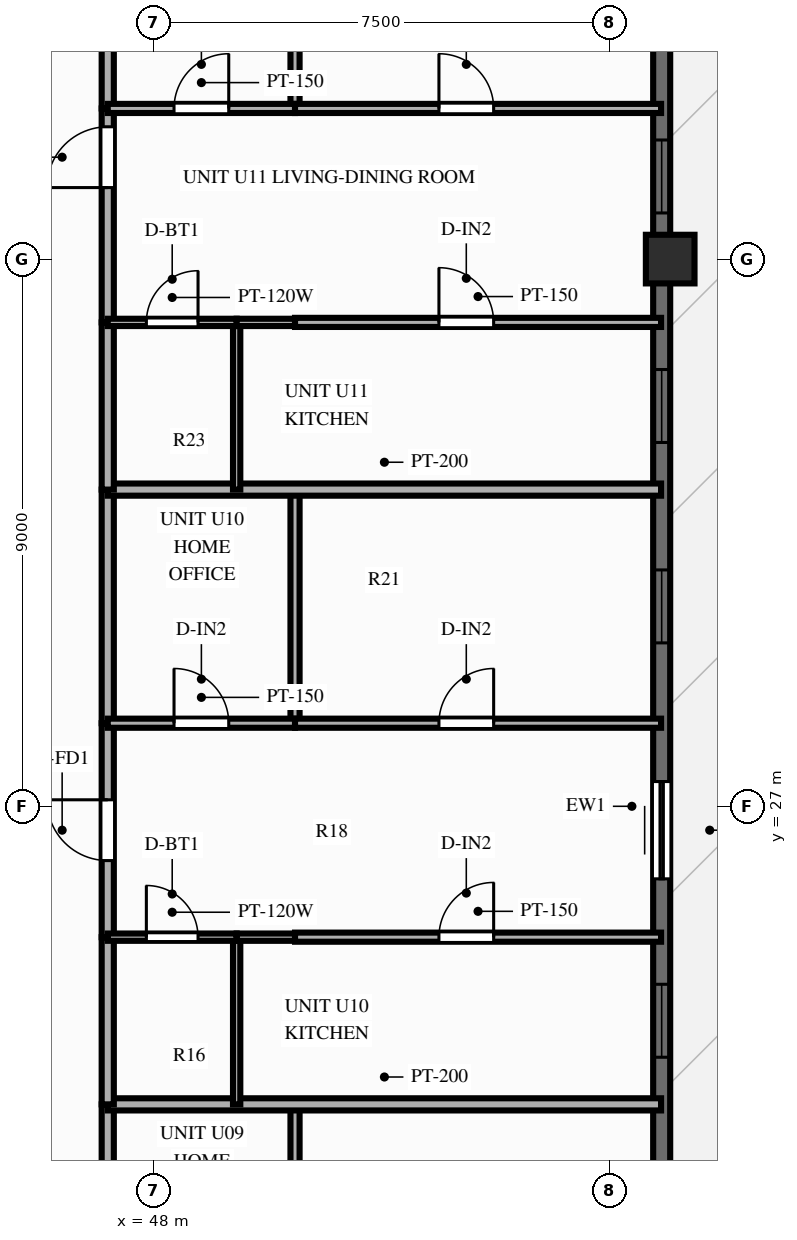
"""IFC4 building model, lengths in metres.
Left out: names, types, materials, properties, quantities, classifications, styles, units other than length and angle.
Written with IfcOpenShell. Run it as: python <this file> out.ifc"""

import sys

from ifc_helpers import new_model, si_unit, direction, frame, frame_2d, origin, origin_2d, place, context, subcontext, project, spatial, rectangle, extrude, source, transform, mapped, element, fill, save


model = new_model("IFC4")
c1 = context("Model", 3, precision=1e-05, world=origin(), true_north=direction((0.0, 1.0)))
c2 = subcontext(c1, "Body", "Model", "MODEL_VIEW")
j1 = project(units=[si_unit("LENGTHUNIT", "METRE"), si_unit("PLANEANGLEUNIT", "RADIAN")], contexts=[c1])
p1 = place(None, origin())
s1 = spatial("IfcSite", under=j1, at=p1, CompositionType="ELEMENT")
p2 = place(p1, origin())
s2 = spatial("IfcBuilding", under=s1, at=p2, CompositionType="ELEMENT")
p3 = place(p2, frame((0.0, 0.0, 196.6)))
s3 = spatial("IfcBuildingStorey", under=s2, at=p3, CompositionType="ELEMENT", Elevation=196.6)
m1 = source(origin(), c2, "Body", "SweptSolid", [
    extrude(rectangle(XDim=0.8, YDim=0.8, at=origin_2d()), origin(), (0.0, 0.0, 1.0), 3.0),
])
p4 = place(p3, frame((56.5, 36.0, 0.0), z_axis=(0.0, 0.0, 1.0), x_axis=(1.0, 0.0, 0.0)))
e1 = element("IfcColumn", 1, at=p4, inside=s3, PredefinedType="COLUMN", context=c2, shape_type="MappedRepresentation", body=[
    mapped(m1, transform((0.0, 0.0, 0.0), scale=1.0)),
])
p5 = place(p3, frame((56.36, 11.5, 0.0), z_axis=(0.0, 0.0, 1.0), x_axis=(0.0, 1.0, 0.0)))
e2 = element("IfcWall", 2, at=p5, inside=s3, PredefinedType="SOLIDWALL", context=c2, shape_type="SweptSolid", body=[
    extrude(rectangle(XDim=31.0, YDim=0.28, at=frame_2d((15.5, 0.0))), origin(), (0.0, 0.0, 1.0), 2.28),
])
p6 = place(p5, frame((0.985, 0.0, 0.25)))
e3 = element("IfcOpeningElement", 3, at=p6, cuts=e2, PredefinedType="OPENING", context=c2, shape_type="SweptSolid", body=[
    extrude(rectangle(XDim=1.2, YDim=1.5, at=frame_2d((0.6, 0.75))), frame((0.0, 0.152, 0.0), z_axis=(0.0, -1.0, 0.0), x_axis=(1.0, 0.0, 0.0)), (0.0, 0.0, 1.0), 0.304),
])
p7 = place(p5, frame((3.995, 0.0, 0.25)))
e4 = element("IfcOpeningElement", 4, at=p7, cuts=e2, PredefinedType="OPENING", context=c2, shape_type="SweptSolid", body=[
    extrude(rectangle(XDim=1.2, YDim=1.5, at=frame_2d((0.6, 0.75))), frame((0.0, 0.152, 0.0), z_axis=(0.0, -1.0, 0.0), x_axis=(1.0, 0.0, 0.0)), (0.0, 0.0, 1.0), 0.304),
])
p8 = place(p5, frame((8.089, 0.0, 0.25)))
e5 = element("IfcOpeningElement", 5, at=p8, cuts=e2, PredefinedType="OPENING", context=c2, shape_type="SweptSolid", body=[
    extrude(rectangle(XDim=1.2, YDim=1.5, at=frame_2d((0.6, 0.75))), frame((0.0, 0.152, 0.0), z_axis=(0.0, -1.0, 0.0), x_axis=(1.0, 0.0, 0.0)), (0.0, 0.0, 1.0), 0.304),
])
p9 = place(p5, frame((11.373, 0.0, 0.25)))
e6 = element("IfcOpeningElement", 6, at=p9, cuts=e2, PredefinedType="OPENING", context=c2, shape_type="SweptSolid", body=[
    extrude(rectangle(XDim=1.2, YDim=1.5, at=frame_2d((0.6, 0.75))), frame((0.0, 0.152, 0.0), z_axis=(0.0, -1.0, 0.0), x_axis=(1.0, 0.0, 0.0)), (0.0, 0.0, 1.0), 0.304),
])
p10 = place(p5, frame((15.907, 0.0, 0.0), z_axis=(0.0, 0.0, 1.0), x_axis=(-1.0, 0.0, 0.0)))
e7 = element("IfcOpeningElement", 7, at=p10, cuts=e2, PredefinedType="OPENING", context=c2, shape_type="SweptSolid", body=[
    extrude(rectangle(XDim=1.6, YDim=2.15, at=frame_2d((0.8, 1.075))), frame((0.0, 0.152, 0.0), z_axis=(0.0, -1.0, 0.0), x_axis=(1.0, 0.0, 0.0)), (0.0, 0.0, 1.0), 0.304),
])
p11 = place(p5, frame((18.188, 0.0, 0.25)))
e8 = element("IfcOpeningElement", 8, at=p11, cuts=e2, PredefinedType="OPENING", context=c2, shape_type="SweptSolid", body=[
    extrude(rectangle(XDim=1.2, YDim=1.5, at=frame_2d((0.6, 0.75))), frame((0.0, 0.152, 0.0), z_axis=(0.0, -1.0, 0.0), x_axis=(1.0, 0.0, 0.0)), (0.0, 0.0, 1.0), 0.304),
])
p12 = place(p5, frame((21.484, 0.0, 0.25)))
e9 = element("IfcOpeningElement", 9, at=p12, cuts=e2, PredefinedType="OPENING", context=c2, shape_type="SweptSolid", body=[
    extrude(rectangle(XDim=1.2, YDim=1.5, at=frame_2d((0.6, 0.75))), frame((0.0, 0.152, 0.0), z_axis=(0.0, -1.0, 0.0), x_axis=(1.0, 0.0, 0.0)), (0.0, 0.0, 1.0), 0.304),
])
p13 = place(p5, frame((25.259, 0.0, 0.25)))
e10 = element("IfcOpeningElement", 10, at=p13, cuts=e2, PredefinedType="OPENING", context=c2, shape_type="SweptSolid", body=[
    extrude(rectangle(XDim=1.2, YDim=1.5, at=frame_2d((0.6, 0.75))), frame((0.0, 0.152, 0.0), z_axis=(0.0, -1.0, 0.0), x_axis=(1.0, 0.0, 0.0)), (0.0, 0.0, 1.0), 0.304),
])
p14 = place(p5, frame((28.269, 0.0, 0.25)))
e11 = element("IfcOpeningElement", 11, at=p14, cuts=e2, PredefinedType="OPENING", context=c2, shape_type="SweptSolid", body=[
    extrude(rectangle(XDim=1.2, YDim=1.5, at=frame_2d((0.6, 0.75))), frame((0.0, 0.152, 0.0), z_axis=(0.0, -1.0, 0.0), x_axis=(1.0, 0.0, 0.0)), (0.0, 0.0, 1.0), 0.304),
])
p15 = place(p3, frame((47.25, 18.28, 0.0), z_axis=(0.0, 0.0, 1.0), x_axis=(0.0, 1.0, 0.0)))
e12 = element("IfcWall", 12, at=p15, inside=s3, PredefinedType="PARTITIONING", context=c2, shape_type="SweptSolid", body=[
    extrude(rectangle(XDim=3.818, YDim=0.2, at=frame_2d((1.909, 0.0))), origin(), (0.0, 0.0, 1.0), 2.79),
])
p16 = place(p3, frame((50.33, 18.28, 0.0), z_axis=(0.0, 0.0, 1.0), x_axis=(0.0, 1.0, 0.0)))
e13 = element("IfcWall", 13, at=p16, inside=s3, PredefinedType="PARTITIONING", context=c2, shape_type="SweptSolid", body=[
    extrude(rectangle(XDim=3.818, YDim=0.15, at=frame_2d((1.909, 0.0))), origin(), (0.0, 0.0, 1.0), 2.49),
])
p17 = place(p3, frame((47.25, 22.098, 0.0), z_axis=(0.0, 0.0, 1.0), x_axis=(1.0, 0.0, 0.0)))
e14 = element("IfcWall", 14, at=p17, inside=s3, PredefinedType="PARTITIONING", context=c2, shape_type="SweptSolid", body=[
    extrude(rectangle(XDim=9.1, YDim=0.2, at=frame_2d((4.55, 0.0))), origin(), (0.0, 0.0, 1.0), 2.39),
])
p18 = place(p3, frame((47.25, 22.098, 0.0), z_axis=(0.0, 0.0, 1.0), x_axis=(0.0, 1.0, 0.0)))
e15 = element("IfcWall", 15, at=p18, inside=s3, PredefinedType="PARTITIONING", context=c2, shape_type="SweptSolid", body=[
    extrude(rectangle(XDim=2.75, YDim=0.2, at=frame_2d((1.375, 0.0))), origin(), (0.0, 0.0, 1.0), 2.79),
])
p19 = place(p3, frame((47.25, 24.848, 0.0), z_axis=(0.0, 0.0, 1.0), x_axis=(0.0, 1.0, 0.0)))
e16 = element("IfcWall", 16, at=p19, inside=s3, PredefinedType="PARTITIONING", context=c2, shape_type="SweptSolid", body=[
    extrude(rectangle(XDim=3.519, YDim=0.2, at=frame_2d((1.759, 0.0))), origin(), (0.0, 0.0, 1.0), 2.79),
])
p20 = place(p19, frame((1.26, 0.0, 0.0)))
e17 = element("IfcOpeningElement", 17, at=p20, cuts=e16, PredefinedType="OPENING", context=c2, shape_type="SweptSolid", body=[
    extrude(rectangle(XDim=1.0, YDim=2.15, at=frame_2d((0.5, 1.075))), frame((0.0, 0.112, 0.0), z_axis=(0.0, -1.0, 0.0), x_axis=(1.0, 0.0, 0.0)), (0.0, 0.0, 1.0), 0.224),
])
p21 = place(p3, frame((47.25, 28.366, 0.0), z_axis=(0.0, 0.0, 1.0), x_axis=(0.0, 1.0, 0.0)))
e18 = element("IfcWall", 18, at=p21, inside=s3, PredefinedType="PARTITIONING", context=c2, shape_type="SweptSolid", body=[
    extrude(rectangle(XDim=3.842, YDim=0.2, at=frame_2d((1.921, 0.0))), origin(), (0.0, 0.0, 1.0), 2.79),
])
p22 = place(p3, frame((49.37, 22.098, 0.0), z_axis=(0.0, 0.0, 1.0), x_axis=(0.0, 1.0, 0.0)))
e19 = element("IfcWall", 19, at=p22, inside=s3, PredefinedType="PARTITIONING", context=c2, shape_type="SweptSolid", body=[
    extrude(rectangle(XDim=2.75, YDim=0.12, at=frame_2d((1.375, 0.0))), origin(), (0.0, 0.0, 1.0), 2.79),
])
p23 = place(p3, frame((50.33, 28.366, 0.0), z_axis=(0.0, 0.0, 1.0), x_axis=(0.0, 1.0, 0.0)))
e20 = element("IfcWall", 20, at=p23, inside=s3, PredefinedType="PARTITIONING", context=c2, shape_type="SweptSolid", body=[
    extrude(rectangle(XDim=3.842, YDim=0.15, at=frame_2d((1.921, 0.0))), origin(), (0.0, 0.0, 1.0), 2.49),
])
p24 = place(p3, frame((47.25, 24.848, 0.0), z_axis=(0.0, 0.0, 1.0), x_axis=(1.0, 0.0, 0.0)))
e21 = element("IfcWall", 21, at=p24, inside=s3, PredefinedType="PARTITIONING", context=c2, shape_type="SweptSolid", body=[
    extrude(rectangle(XDim=2.12, YDim=0.12, at=frame_2d((1.06, 0.0))), origin(), (0.0, 0.0, 1.0), 2.79),
])
p25 = place(p24, frame((0.635, 0.0, 0.0)))
e22 = element("IfcOpeningElement", 22, at=p25, cuts=e21, PredefinedType="OPENING", context=c2, shape_type="SweptSolid", body=[
    extrude(rectangle(XDim=0.85, YDim=2.05, at=frame_2d((0.425, 1.025))), frame((0.0, 0.072, 0.0), z_axis=(0.0, -1.0, 0.0), x_axis=(1.0, 0.0, 0.0)), (0.0, 0.0, 1.0), 0.144),
])
p26 = place(p3, frame((49.37, 24.848, 0.0), z_axis=(0.0, 0.0, 1.0), x_axis=(1.0, 0.0, 0.0)))
e23 = element("IfcWall", 23, at=p26, inside=s3, PredefinedType="PARTITIONING", context=c2, shape_type="SweptSolid", body=[
    extrude(rectangle(XDim=0.96, YDim=0.12, at=frame_2d((0.48, 0.0))), origin(), (0.0, 0.0, 1.0), 2.79),
])
p27 = place(p3, frame((50.33, 24.848, 0.0), z_axis=(0.0, 0.0, 1.0), x_axis=(1.0, 0.0, 0.0)))
e24 = element("IfcWall", 24, at=p27, inside=s3, PredefinedType="PARTITIONING", context=c2, shape_type="SweptSolid", body=[
    extrude(rectangle(XDim=6.02, YDim=0.15, at=frame_2d((3.01, 0.0))), origin(), (0.0, 0.0, 1.0), 2.79),
])
p28 = place(p27, frame((2.367, 0.0, 0.0)))
e25 = element("IfcOpeningElement", 25, at=p28, cuts=e24, PredefinedType="OPENING", context=c2, shape_type="SweptSolid", body=[
    extrude(rectangle(XDim=0.9, YDim=2.1, at=frame_2d((0.45, 1.05))), frame((0.0, 0.087, 0.0), z_axis=(0.0, -1.0, 0.0), x_axis=(1.0, 0.0, 0.0)), (0.0, 0.0, 1.0), 0.174),
])
p29 = place(p3, frame((47.25, 28.366, 0.0), z_axis=(0.0, 0.0, 1.0), x_axis=(1.0, 0.0, 0.0)))
e26 = element("IfcWall", 26, at=p29, inside=s3, PredefinedType="PARTITIONING", context=c2, shape_type="SweptSolid", body=[
    extrude(rectangle(XDim=3.08, YDim=0.15, at=frame_2d((1.54, 0.0))), origin(), (0.0, 0.0, 1.0), 2.79),
])
p30 = place(p29, frame((1.09, 0.0, 0.0)))
e27 = element("IfcOpeningElement", 27, at=p30, cuts=e26, PredefinedType="OPENING", context=c2, shape_type="SweptSolid", body=[
    extrude(rectangle(XDim=0.9, YDim=2.1, at=frame_2d((0.45, 1.05))), frame((0.0, 0.087, 0.0), z_axis=(0.0, -1.0, 0.0), x_axis=(1.0, 0.0, 0.0)), (0.0, 0.0, 1.0), 0.174),
])
p31 = place(p3, frame((50.33, 28.366, 0.0), z_axis=(0.0, 0.0, 1.0), x_axis=(1.0, 0.0, 0.0)))
e28 = element("IfcWall", 28, at=p31, inside=s3, PredefinedType="PARTITIONING", context=c2, shape_type="SweptSolid", body=[
    extrude(rectangle(XDim=6.02, YDim=0.15, at=frame_2d((3.01, 0.0))), origin(), (0.0, 0.0, 1.0), 2.79),
])
p32 = place(p31, frame((2.367, 0.0, 0.0)))
e29 = element("IfcOpeningElement", 29, at=p32, cuts=e28, PredefinedType="OPENING", context=c2, shape_type="SweptSolid", body=[
    extrude(rectangle(XDim=0.9, YDim=2.1, at=frame_2d((0.45, 1.05))), frame((0.0, 0.087, 0.0), z_axis=(0.0, -1.0, 0.0), x_axis=(1.0, 0.0, 0.0)), (0.0, 0.0, 1.0), 0.174),
])
p33 = place(p3, frame((47.25, 32.209, 0.0), z_axis=(0.0, 0.0, 1.0), x_axis=(1.0, 0.0, 0.0)))
e30 = element("IfcWall", 30, at=p33, inside=s3, PredefinedType="PARTITIONING", context=c2, shape_type="SweptSolid", body=[
    extrude(rectangle(XDim=9.1, YDim=0.2, at=frame_2d((4.55, 0.0))), origin(), (0.0, 0.0, 1.0), 2.39),
])
p34 = place(p3, frame((47.25, 32.209, 0.0), z_axis=(0.0, 0.0, 1.0), x_axis=(0.0, 1.0, 0.0)))
e31 = element("IfcWall", 31, at=p34, inside=s3, PredefinedType="PARTITIONING", context=c2, shape_type="SweptSolid", body=[
    extrude(rectangle(XDim=2.75, YDim=0.2, at=frame_2d((1.375, 0.0))), origin(), (0.0, 0.0, 1.0), 2.79),
])
p35 = place(p3, frame((47.25, 34.959, 0.0), z_axis=(0.0, 0.0, 1.0), x_axis=(0.0, 1.0, 0.0)))
e32 = element("IfcWall", 32, at=p35, inside=s3, PredefinedType="PARTITIONING", context=c2, shape_type="SweptSolid", body=[
    extrude(rectangle(XDim=3.519, YDim=0.2, at=frame_2d((1.76, 0.0))), origin(), (0.0, 0.0, 1.0), 2.79),
])
p36 = place(p35, frame((2.217, 0.0, 0.0)))
e33 = element("IfcOpeningElement", 33, at=p36, cuts=e32, PredefinedType="OPENING", context=c2, shape_type="SweptSolid", body=[
    extrude(rectangle(XDim=1.0, YDim=2.15, at=frame_2d((0.5, 1.075))), frame((0.0, 0.112, 0.0), z_axis=(0.0, -1.0, 0.0), x_axis=(1.0, 0.0, 0.0)), (0.0, 0.0, 1.0), 0.224),
])
p37 = place(p3, frame((47.25, 38.478, 0.0), z_axis=(0.0, 0.0, 1.0), x_axis=(0.0, 1.0, 0.0)))
e34 = element("IfcWall", 34, at=p37, inside=s3, PredefinedType="PARTITIONING", context=c2, shape_type="SweptSolid", body=[
    extrude(rectangle(XDim=3.842, YDim=0.2, at=frame_2d((1.921, 0.0))), origin(), (0.0, 0.0, 1.0), 2.79),
])
p38 = place(p3, frame((49.37, 32.209, 0.0), z_axis=(0.0, 0.0, 1.0), x_axis=(0.0, 1.0, 0.0)))
e35 = element("IfcWall", 35, at=p38, inside=s3, PredefinedType="PARTITIONING", context=c2, shape_type="SweptSolid", body=[
    extrude(rectangle(XDim=2.75, YDim=0.12, at=frame_2d((1.375, 0.0))), origin(), (0.0, 0.0, 1.0), 2.79),
])
p39 = place(p3, frame((50.33, 38.478, 0.0), z_axis=(0.0, 0.0, 1.0), x_axis=(0.0, 1.0, 0.0)))
e36 = element("IfcWall", 36, at=p39, inside=s3, PredefinedType="PARTITIONING", context=c2, shape_type="SweptSolid", body=[
    extrude(rectangle(XDim=3.842, YDim=0.15, at=frame_2d((1.921, 0.0))), origin(), (0.0, 0.0, 1.0), 2.79),
])
p40 = place(p3, frame((47.25, 34.959, 0.0), z_axis=(0.0, 0.0, 1.0), x_axis=(1.0, 0.0, 0.0)))
e37 = element("IfcWall", 37, at=p40, inside=s3, PredefinedType="PARTITIONING", context=c2, shape_type="SweptSolid", body=[
    extrude(rectangle(XDim=2.12, YDim=0.12, at=frame_2d((1.06, 0.0))), origin(), (0.0, 0.0, 1.0), 2.79),
])
p41 = place(p40, frame((0.635, 0.0, 0.0)))
e38 = element("IfcOpeningElement", 38, at=p41, cuts=e37, PredefinedType="OPENING", context=c2, shape_type="SweptSolid", body=[
    extrude(rectangle(XDim=0.85, YDim=2.05, at=frame_2d((0.425, 1.025))), frame((0.0, 0.072, 0.0), z_axis=(0.0, -1.0, 0.0), x_axis=(1.0, 0.0, 0.0)), (0.0, 0.0, 1.0), 0.144),
])
p42 = place(p3, frame((49.37, 34.959, 0.0), z_axis=(0.0, 0.0, 1.0), x_axis=(1.0, 0.0, 0.0)))
e39 = element("IfcWall", 39, at=p42, inside=s3, PredefinedType="PARTITIONING", context=c2, shape_type="SweptSolid", body=[
    extrude(rectangle(XDim=0.96, YDim=0.12, at=frame_2d((0.48, 0.0))), origin(), (0.0, 0.0, 1.0), 2.79),
])
p43 = place(p3, frame((50.33, 34.959, 0.0), z_axis=(0.0, 0.0, 1.0), x_axis=(1.0, 0.0, 0.0)))
e40 = element("IfcWall", 40, at=p43, inside=s3, PredefinedType="PARTITIONING", context=c2, shape_type="SweptSolid", body=[
    extrude(rectangle(XDim=6.02, YDim=0.15, at=frame_2d((3.01, 0.0))), origin(), (0.0, 0.0, 1.0), 2.79),
])
p44 = place(p43, frame((2.367, 0.0, 0.0)))
e41 = element("IfcOpeningElement", 41, at=p44, cuts=e40, PredefinedType="OPENING", context=c2, shape_type="SweptSolid", body=[
    extrude(rectangle(XDim=0.9, YDim=2.1, at=frame_2d((0.45, 1.05))), frame((0.0, 0.087, 0.0), z_axis=(0.0, -1.0, 0.0), x_axis=(1.0, 0.0, 0.0)), (0.0, 0.0, 1.0), 0.174),
])
p45 = place(p3, frame((47.25, 38.478, 0.0), z_axis=(0.0, 0.0, 1.0), x_axis=(1.0, 0.0, 0.0)))
e42 = element("IfcWall", 42, at=p45, inside=s3, PredefinedType="PARTITIONING", context=c2, shape_type="SweptSolid", body=[
    extrude(rectangle(XDim=3.08, YDim=0.15, at=frame_2d((1.54, 0.0))), origin(), (0.0, 0.0, 1.0), 2.79),
])
p46 = place(p45, frame((1.09, 0.0, 0.0)))
e43 = element("IfcOpeningElement", 43, at=p46, cuts=e42, PredefinedType="OPENING", context=c2, shape_type="SweptSolid", body=[
    extrude(rectangle(XDim=0.9, YDim=2.1, at=frame_2d((0.45, 1.05))), frame((0.0, 0.087, 0.0), z_axis=(0.0, -1.0, 0.0), x_axis=(1.0, 0.0, 0.0)), (0.0, 0.0, 1.0), 0.174),
])
p47 = place(p3, frame((50.33, 38.478, 0.0), z_axis=(0.0, 0.0, 1.0), x_axis=(1.0, 0.0, 0.0)))
e44 = element("IfcWall", 44, at=p47, inside=s3, PredefinedType="PARTITIONING", context=c2, shape_type="SweptSolid", body=[
    extrude(rectangle(XDim=6.02, YDim=0.15, at=frame_2d((3.01, 0.0))), origin(), (0.0, 0.0, 1.0), 2.79),
])
p48 = place(p47, frame((2.367, 0.0, 0.0)))
e45 = element("IfcOpeningElement", 45, at=p48, cuts=e44, PredefinedType="OPENING", context=c2, shape_type="SweptSolid", body=[
    extrude(rectangle(XDim=0.9, YDim=2.1, at=frame_2d((0.45, 1.05))), frame((0.0, 0.087, 0.0), z_axis=(0.0, -1.0, 0.0), x_axis=(1.0, 0.0, 0.0)), (0.0, 0.0, 1.0), 0.174),
])
m2 = source(origin(), c2, "Body", "SweptSolid", [
    extrude(rectangle(XDim=1.2, YDim=1.5, at=frame_2d((0.6, 0.75))), frame((0.0, 0.03, 0.0), z_axis=(0.0, -1.0, 0.0), x_axis=(1.0, 0.0, 0.0)), (0.0, 0.0, 1.0), 0.06),
])
p49 = place(p9, origin())
e46 = element("IfcWindow", 46, at=p49, inside=s3, PartitioningType="SINGLE_PANEL", PredefinedType="WINDOW", context=c2, shape_type="MappedRepresentation", body=[
    mapped(m2, transform((0.0, 0.0, 0.0), scale=1.0)),
])
fill(e6, e46)
m3 = source(origin(), c2, "Body", "SweptSolid", [
    extrude(rectangle(XDim=1.6, YDim=2.15, at=frame_2d((0.8, 1.075))), frame((0.0, 0.025, 0.0), z_axis=(0.0, -1.0, 0.0), x_axis=(1.0, 0.0, 0.0)), (0.0, 0.0, 1.0), 0.05),
])
p50 = place(p10, origin())
e47 = element("IfcDoor", 47, at=p50, inside=s3, OperationType="SLIDING_TO_LEFT", PredefinedType="DOOR", context=c2, shape_type="MappedRepresentation", body=[
    mapped(m3, transform((0.0, 0.0, 0.0), scale=1.0)),
])
fill(e7, e47)
p51 = place(p11, origin())
e48 = element("IfcWindow", 48, at=p51, inside=s3, PartitioningType="SINGLE_PANEL", PredefinedType="WINDOW", context=c2, shape_type="MappedRepresentation", body=[
    mapped(m2, transform((0.0, 0.0, 0.0), scale=1.0)),
])
fill(e8, e48)
p52 = place(p12, origin())
e49 = element("IfcWindow", 49, at=p52, inside=s3, PartitioningType="SINGLE_PANEL", PredefinedType="WINDOW", context=c2, shape_type="MappedRepresentation", body=[
    mapped(m2, transform((0.0, 0.0, 0.0), scale=1.0)),
])
fill(e9, e49)
p53 = place(p13, origin())
e50 = element("IfcWindow", 50, at=p53, inside=s3, PartitioningType="SINGLE_PANEL", PredefinedType="WINDOW", context=c2, shape_type="MappedRepresentation", body=[
    mapped(m2, transform((0.0, 0.0, 0.0), scale=1.0)),
])
fill(e10, e50)
m4 = source(origin(), c2, "Body", "SweptSolid", [
    extrude(rectangle(XDim=1.0, YDim=2.15, at=frame_2d((0.5, 1.075))), frame((0.0, 0.025, 0.0), z_axis=(0.0, -1.0, 0.0), x_axis=(1.0, 0.0, 0.0)), (0.0, 0.0, 1.0), 0.05),
])
p54 = place(p20, origin())
e51 = element("IfcDoor", 51, at=p54, inside=s3, OperationType="SINGLE_SWING_RIGHT", PredefinedType="DOOR", context=c2, shape_type="MappedRepresentation", body=[
    mapped(m4, transform((0.0, 0.0, 0.0), scale=1.0)),
])
fill(e17, e51)
m5 = source(origin(), c2, "Body", "SweptSolid", [
    extrude(rectangle(XDim=0.85, YDim=2.05, at=frame_2d((0.425, 1.025))), frame((0.0, 0.025, 0.0), z_axis=(0.0, -1.0, 0.0), x_axis=(1.0, 0.0, 0.0)), (0.0, 0.0, 1.0), 0.05),
])
p55 = place(p25, origin())
e52 = element("IfcDoor", 52, at=p55, inside=s3, OperationType="SINGLE_SWING_LEFT", PredefinedType="DOOR", context=c2, shape_type="MappedRepresentation", body=[
    mapped(m5, transform((0.0, 0.0, 0.0), scale=1.0)),
])
fill(e22, e52)
m6 = source(origin(), c2, "Body", "SweptSolid", [
    extrude(rectangle(XDim=0.9, YDim=2.1, at=frame_2d((0.45, 1.05))), frame((0.0, 0.025, 0.0), z_axis=(0.0, -1.0, 0.0), x_axis=(1.0, 0.0, 0.0)), (0.0, 0.0, 1.0), 0.05),
])
p56 = place(p28, origin())
e53 = element("IfcDoor", 53, at=p56, inside=s3, OperationType="SINGLE_SWING_RIGHT", PredefinedType="DOOR", context=c2, shape_type="MappedRepresentation", body=[
    mapped(m6, transform((0.0, 0.0, 0.0), scale=1.0)),
])
fill(e25, e53)
p57 = place(p30, origin())
e54 = element("IfcDoor", 54, at=p57, inside=s3, OperationType="SINGLE_SWING_LEFT", PredefinedType="DOOR", context=c2, shape_type="MappedRepresentation", body=[
    mapped(m6, transform((0.0, 0.0, 0.0), scale=1.0)),
])
fill(e27, e54)
p58 = place(p32, origin())
e55 = element("IfcDoor", 55, at=p58, inside=s3, OperationType="SINGLE_SWING_RIGHT", PredefinedType="DOOR", context=c2, shape_type="MappedRepresentation", body=[
    mapped(m6, transform((0.0, 0.0, 0.0), scale=1.0)),
])
fill(e29, e55)
p59 = place(p36, origin())
e56 = element("IfcDoor", 56, at=p59, inside=s3, OperationType="SINGLE_SWING_LEFT", PredefinedType="DOOR", context=c2, shape_type="MappedRepresentation", body=[
    mapped(m4, transform((0.0, 0.0, 0.0), scale=1.0)),
])
fill(e33, e56)
p60 = place(p41, origin())
e57 = element("IfcDoor", 57, at=p60, inside=s3, OperationType="SINGLE_SWING_RIGHT", PredefinedType="DOOR", context=c2, shape_type="MappedRepresentation", body=[
    mapped(m5, transform((0.0, 0.0, 0.0), scale=1.0)),
])
fill(e38, e57)
p61 = place(p44, origin())
e58 = element("IfcDoor", 58, at=p61, inside=s3, OperationType="SINGLE_SWING_LEFT", PredefinedType="DOOR", context=c2, shape_type="MappedRepresentation", body=[
    mapped(m6, transform((0.0, 0.0, 0.0), scale=1.0)),
])
fill(e41, e58)
p62 = place(p46, origin())
e59 = element("IfcDoor", 59, at=p62, inside=s3, OperationType="SINGLE_SWING_RIGHT", PredefinedType="DOOR", context=c2, shape_type="MappedRepresentation", body=[
    mapped(m6, transform((0.0, 0.0, 0.0), scale=1.0)),
])
fill(e43, e59)
p63 = place(p48, origin())
e60 = element("IfcDoor", 60, at=p63, inside=s3, OperationType="SINGLE_SWING_LEFT", PredefinedType="DOOR", context=c2, shape_type="MappedRepresentation", body=[
    mapped(m6, transform((0.0, 0.0, 0.0), scale=1.0)),
])
fill(e45, e60)
save(model, sys.argv[1])
